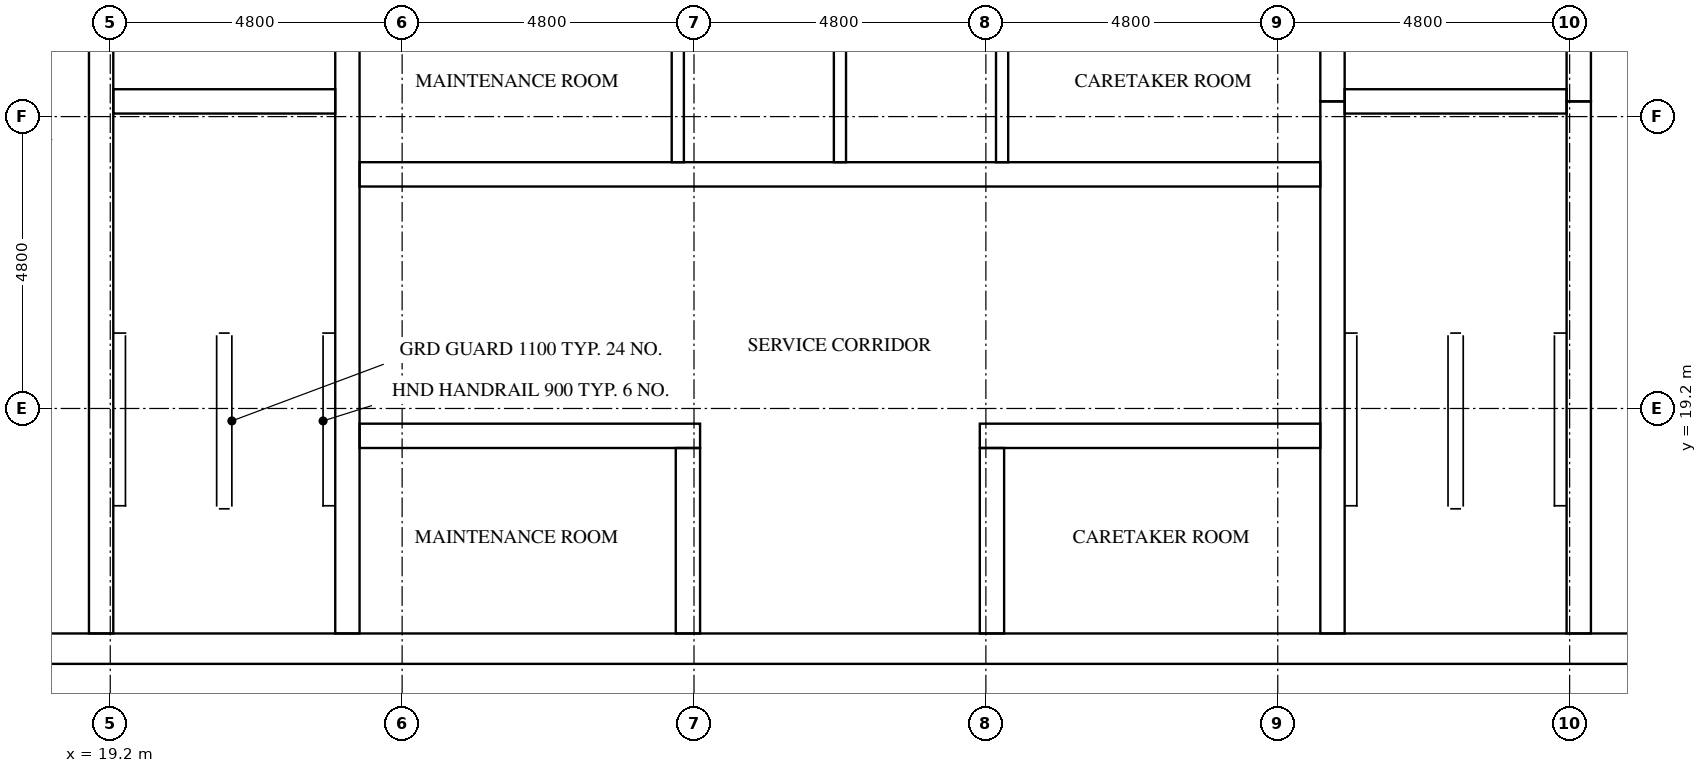
"""IFC4 building model, lengths in metres.
Left out: names, types, materials, properties, quantities, classifications, styles, units other than length and angle.
Written with IfcOpenShell. Run it as: python <this file> out.ifc"""

import sys

from ifc_helpers import new_model, si_unit, direction, frame, frame_2d, origin, place, context, subcontext, project, spatial, rectangle, extrude, element, fill, save


model = new_model("IFC4")
c1 = context("Model", 3, precision=1e-05, world=origin(), true_north=direction((0.0, 1.0)))
c2 = subcontext(c1, "Body", "Model", "MODEL_VIEW")
j1 = project(units=[si_unit("LENGTHUNIT", "METRE"), si_unit("PLANEANGLEUNIT", "RADIAN")], contexts=[c1])
p1 = place(None, origin())
s1 = spatial("IfcSite", under=j1, at=p1, CompositionType="ELEMENT")
p2 = place(p1, origin())
s2 = spatial("IfcBuilding", under=s1, at=p2, CompositionType="ELEMENT")
p3 = place(p2, frame((0.0, 0.0, 275.6)))
s3 = spatial("IfcBuildingStorey", under=s2, at=p3, CompositionType="ELEMENT", Elevation=275.6)
p4 = place(p3, frame((15.0, 15.25, 0.0), z_axis=(0.0, 0.0, 1.0), x_axis=(1.0, 0.0, 0.0)))
e1 = element("IfcWall", 1, at=p4, inside=s3, PredefinedType="SHEAR", context=c2, shape_type="SweptSolid", body=[
    extrude(rectangle(XDim=32.4, YDim=0.5, at=frame_2d((16.2, 0.0))), origin(), (0.0, 0.0, 1.0), 3.2),
])
p5 = place(p4, frame((15.3, 0.0, 0.0)))
e2 = element("IfcOpeningElement", 2, at=p5, cuts=e1, PredefinedType="OPENING", context=c2, shape_type="SweptSolid", body=[
    extrude(rectangle(XDim=1.8, YDim=2.1, at=frame_2d((0.9, 1.05))), frame((0.0, 0.26, 0.0), z_axis=(0.0, -1.0, 0.0), x_axis=(1.0, 0.0, 0.0)), (0.0, 0.0, 1.0), 0.52),
])
p6 = place(p3, frame((19.05, 15.5, 0.0), z_axis=(0.0, 0.0, 1.0), x_axis=(0.0, 1.0, 0.0)))
e3 = element("IfcWall", 3, at=p6, inside=s3, PredefinedType="SHEAR", context=c2, shape_type="SweptSolid", body=[
    extrude(rectangle(XDim=15.55, YDim=0.4, at=frame_2d((7.775, 0.0))), origin(), (0.0, 0.0, 1.0), 3.2),
])
p7 = place(p6, frame((9.95, 0.0, 0.0)))
e4 = element("IfcOpeningElement", 4, at=p7, cuts=e3, PredefinedType="OPENING", context=c2, shape_type="SweptSolid", body=[
    extrude(rectangle(XDim=1.1, YDim=2.1, at=frame_2d((0.55, 1.05))), frame((0.0, 0.21, 0.0), z_axis=(0.0, -1.0, 0.0), x_axis=(1.0, 0.0, 0.0)), (0.0, 0.0, 1.0), 0.42),
])
p8 = place(p6, frame((13.45, 0.0, 0.0)))
e5 = element("IfcOpeningElement", 5, at=p8, cuts=e3, PredefinedType="OPENING", context=c2, shape_type="SweptSolid", body=[
    extrude(rectangle(XDim=1.1, YDim=2.1, at=frame_2d((0.55, 1.05))), frame((0.0, 0.21, 0.0), z_axis=(0.0, -1.0, 0.0), x_axis=(1.0, 0.0, 0.0)), (0.0, 0.0, 1.0), 0.42),
])
p9 = place(p6, frame((0.7, 0.0, 0.0)))
e6 = element("IfcOpeningElement", 6, at=p9, cuts=e3, PredefinedType="OPENING", context=c2, shape_type="SweptSolid", body=[
    extrude(rectangle(XDim=1.2, YDim=2.1, at=frame_2d((0.6, 1.05))), frame((0.0, 0.21, 0.0), z_axis=(0.0, -1.0, 0.0), x_axis=(1.0, 0.0, 0.0)), (0.0, 0.0, 1.0), 0.42),
])
p10 = place(p3, frame((23.1, 15.5, 0.0), z_axis=(0.0, 0.0, 1.0), x_axis=(0.0, 1.0, 0.0)))
e7 = element("IfcWall", 7, at=p10, inside=s3, PredefinedType="SHEAR", context=c2, shape_type="SweptSolid", body=[
    extrude(rectangle(XDim=21.8, YDim=0.4, at=frame_2d((10.9, 0.0))), origin(), (0.0, 0.0, 1.0), 3.2),
])
p11 = place(p3, frame((39.3, 15.5, 0.0), z_axis=(0.0, 0.0, 1.0), x_axis=(0.0, 1.0, 0.0)))
e8 = element("IfcWall", 8, at=p11, inside=s3, PredefinedType="SHEAR", context=c2, shape_type="SweptSolid", body=[
    extrude(rectangle(XDim=8.75, YDim=0.4, at=frame_2d((4.375, 0.0))), origin(), (0.0, 0.0, 1.0), 3.2),
])
p12 = place(p3, frame((39.3, 24.25, 0.0), z_axis=(0.0, 0.0, 1.0), x_axis=(0.0, 1.0, 0.0)))
e9 = element("IfcWall", 9, at=p12, inside=s3, PredefinedType="SHEAR", context=c2, shape_type="SweptSolid", body=[
    extrude(rectangle(XDim=3.5, YDim=0.4, at=frame_2d((1.75, 0.0))), origin(), (0.0, 0.0, 1.0), 3.2),
])
p13 = place(p3, frame((43.35, 15.5, 0.0), z_axis=(0.0, 0.0, 1.0), x_axis=(0.0, 1.0, 0.0)))
e10 = element("IfcWall", 10, at=p13, inside=s3, PredefinedType="SHEAR", context=c2, shape_type="SweptSolid", body=[
    extrude(rectangle(XDim=8.75, YDim=0.4, at=frame_2d((4.375, 0.0))), origin(), (0.0, 0.0, 1.0), 3.2),
])
p14 = place(p13, frame((0.7, 0.0, 0.0)))
e11 = element("IfcOpeningElement", 11, at=p14, cuts=e10, PredefinedType="OPENING", context=c2, shape_type="SweptSolid", body=[
    extrude(rectangle(XDim=1.2, YDim=2.1, at=frame_2d((0.6, 1.05))), frame((0.0, 0.21, 0.0), z_axis=(0.0, -1.0, 0.0), x_axis=(1.0, 0.0, 0.0)), (0.0, 0.0, 1.0), 0.42),
])
p15 = place(p3, frame((43.35, 24.25, 0.0), z_axis=(0.0, 0.0, 1.0), x_axis=(0.0, 1.0, 0.0)))
e12 = element("IfcWall", 12, at=p15, inside=s3, PredefinedType="SHEAR", context=c2, shape_type="SweptSolid", body=[
    extrude(rectangle(XDim=3.5, YDim=0.4, at=frame_2d((1.75, 0.0))), origin(), (0.0, 0.0, 1.0), 3.2),
])
p16 = place(p15, frame((1.2, 0.0, 0.0)))
e13 = element("IfcOpeningElement", 13, at=p16, cuts=e12, PredefinedType="OPENING", context=c2, shape_type="SweptSolid", body=[
    extrude(rectangle(XDim=1.1, YDim=2.1, at=frame_2d((0.55, 1.05))), frame((0.0, 0.21, 0.0), z_axis=(0.0, -1.0, 0.0), x_axis=(1.0, 0.0, 0.0)), (0.0, 0.0, 1.0), 0.42),
])
for number, where, z_axis, x_axis in (
    (14, (19.25, 24.25, 0.0), (0.0, 0.0, 1.0), (1.0, 0.0, 0.0)),
    (15, (39.5, 24.25, 0.0), (0.0, 0.0, 1.0), (1.0, 0.0, 0.0)),
):
    element("IfcWall", number, at=place(p3, frame(where, z_axis=z_axis, x_axis=x_axis)), inside=s3, PredefinedType="SHEAR", context=c2, shape_type="SweptSolid", body=[
        extrude(rectangle(XDim=3.65, YDim=0.4, at=frame_2d((1.825, 0.0))), origin(), (0.0, 0.0, 1.0), 3.2),
    ])
p17 = place(p3, frame((23.3, 18.75, 0.0), z_axis=(0.0, 0.0, 1.0), x_axis=(1.0, 0.0, 0.0)))
e16 = element("IfcWall", 16, at=p17, inside=s3, PredefinedType="SHEAR", context=c2, shape_type="SweptSolid", body=[
    extrude(rectangle(XDim=5.6, YDim=0.4, at=frame_2d((2.8, 0.0))), origin(), (0.0, 0.0, 1.0), 3.2),
])
p18 = place(p17, frame((2.1, 0.0, 0.0)))
e17 = element("IfcOpeningElement", 17, at=p18, cuts=e16, PredefinedType="OPENING", context=c2, shape_type="SweptSolid", body=[
    extrude(rectangle(XDim=1.0, YDim=2.1, at=frame_2d((0.5, 1.05))), frame((0.0, 0.21, 0.0), z_axis=(0.0, -1.0, 0.0), x_axis=(1.0, 0.0, 0.0)), (0.0, 0.0, 1.0), 0.42),
])
p19 = place(p3, frame((33.5, 18.75, 0.0), z_axis=(0.0, 0.0, 1.0), x_axis=(1.0, 0.0, 0.0)))
e18 = element("IfcWall", 18, at=p19, inside=s3, PredefinedType="SHEAR", context=c2, shape_type="SweptSolid", body=[
    extrude(rectangle(XDim=5.6, YDim=0.4, at=frame_2d((2.8, 0.0))), origin(), (0.0, 0.0, 1.0), 3.2),
])
p20 = place(p19, frame((2.5, 0.0, 0.0)))
e19 = element("IfcOpeningElement", 19, at=p20, cuts=e18, PredefinedType="OPENING", context=c2, shape_type="SweptSolid", body=[
    extrude(rectangle(XDim=1.0, YDim=2.1, at=frame_2d((0.5, 1.05))), frame((0.0, 0.21, 0.0), z_axis=(0.0, -1.0, 0.0), x_axis=(1.0, 0.0, 0.0)), (0.0, 0.0, 1.0), 0.42),
])
p21 = place(p3, frame((23.3, 23.05, 0.0), z_axis=(0.0, 0.0, 1.0), x_axis=(1.0, 0.0, 0.0)))
e20 = element("IfcWall", 20, at=p21, inside=s3, PredefinedType="SHEAR", context=c2, shape_type="SweptSolid", body=[
    extrude(rectangle(XDim=15.8, YDim=0.4, at=frame_2d((7.9, 0.0))), origin(), (0.0, 0.0, 1.0), 3.2),
])
p22 = place(p21, frame((2.067, 0.0, 0.0)))
e21 = element("IfcOpeningElement", 21, at=p22, cuts=e20, PredefinedType="OPENING", context=c2, shape_type="SweptSolid", body=[
    extrude(rectangle(XDim=1.0, YDim=2.1, at=frame_2d((0.5, 1.05))), frame((0.0, 0.21, 0.0), z_axis=(0.0, -1.0, 0.0), x_axis=(1.0, 0.0, 0.0)), (0.0, 0.0, 1.0), 0.42),
])
p23 = place(p21, frame((12.733, 0.0, 0.0)))
e22 = element("IfcOpeningElement", 22, at=p23, cuts=e20, PredefinedType="OPENING", context=c2, shape_type="SweptSolid", body=[
    extrude(rectangle(XDim=1.0, YDim=2.1, at=frame_2d((0.5, 1.05))), frame((0.0, 0.21, 0.0), z_axis=(0.0, -1.0, 0.0), x_axis=(1.0, 0.0, 0.0)), (0.0, 0.0, 1.0), 0.42),
])
for number, where, z_axis, x_axis in (
    (23, (28.7, 15.5, 0.0), (0.0, 0.0, 1.0), (0.0, 1.0, 0.0)),
    (24, (33.7, 15.5, 0.0), (0.0, 0.0, 1.0), (0.0, 1.0, 0.0)),
):
    element("IfcWall", number, at=place(p3, frame(where, z_axis=z_axis, x_axis=x_axis)), inside=s3, PredefinedType="SHEAR", context=c2, shape_type="SweptSolid", body=[
        extrude(rectangle(XDim=3.05, YDim=0.4, at=frame_2d((1.525, 0.0))), origin(), (0.0, 0.0, 1.0), 3.2),
    ])
for number, where, z_axis, x_axis in (
    (25, (28.533, 23.25, 0.0), (0.0, 0.0, 1.0), (0.0, 1.0, 0.0)),
    (26, (31.2, 23.25, 0.0), (0.0, 0.0, 1.0), (0.0, 1.0, 0.0)),
    (27, (33.867, 23.25, 0.0), (0.0, 0.0, 1.0), (0.0, 1.0, 0.0)),
):
    element("IfcWall", number, at=place(p3, frame(where, z_axis=z_axis, x_axis=x_axis)), inside=s3, PredefinedType="SOLIDWALL", context=c2, shape_type="SweptSolid", body=[
        extrude(rectangle(XDim=2.7, YDim=0.2, at=frame_2d((1.35, 0.0))), origin(), (0.0, 0.0, 1.0), 3.2),
    ])
p24 = place(p9, frame((1.2, 0.0, 0.0), z_axis=(0.0, 0.0, 1.0), x_axis=(-1.0, 0.0, 0.0)))
e28 = element("IfcDoor", 28, at=p24, inside=s3, OperationType="SINGLE_SWING_RIGHT", PredefinedType="DOOR", context=c2, shape_type="SweptSolid", body=[
    extrude(rectangle(XDim=1.2, YDim=2.1, at=frame_2d((0.6, 1.05))), frame((0.0, 0.025, 0.0), z_axis=(0.0, -1.0, 0.0), x_axis=(1.0, 0.0, 0.0)), (0.0, 0.0, 1.0), 0.05),
])
fill(e6, e28)
p25 = place(p14, origin())
e29 = element("IfcDoor", 29, at=p25, inside=s3, OperationType="SINGLE_SWING_LEFT", PredefinedType="DOOR", context=c2, shape_type="SweptSolid", body=[
    extrude(rectangle(XDim=1.2, YDim=2.1, at=frame_2d((0.6, 1.05))), frame((0.0, 0.025, 0.0), z_axis=(0.0, -1.0, 0.0), x_axis=(1.0, 0.0, 0.0)), (0.0, 0.0, 1.0), 0.05),
])
fill(e11, e29)
p26 = place(p5, frame((1.8, 0.0, 0.0), z_axis=(0.0, 0.0, 1.0), x_axis=(-1.0, 0.0, 0.0)))
e30 = element("IfcDoor", 30, at=p26, inside=s3, OperationType="DOUBLE_DOOR_SINGLE_SWING", PredefinedType="DOOR", context=c2, shape_type="SweptSolid", body=[
    extrude(rectangle(XDim=1.8, YDim=2.1, at=frame_2d((0.9, 1.05))), frame((0.0, 0.025, 0.0), z_axis=(0.0, -1.0, 0.0), x_axis=(1.0, 0.0, 0.0)), (0.0, 0.0, 1.0), 0.05),
])
fill(e2, e30)
p27 = place(p22, frame((1.0, 0.0, 0.0), z_axis=(0.0, 0.0, 1.0), x_axis=(-1.0, 0.0, 0.0)))
e31 = element("IfcDoor", 31, at=p27, inside=s3, OperationType="SINGLE_SWING_LEFT", PredefinedType="DOOR", context=c2, shape_type="SweptSolid", body=[
    extrude(rectangle(XDim=1.0, YDim=2.1, at=frame_2d((0.5, 1.05))), frame((0.0, 0.025, 0.0), z_axis=(0.0, -1.0, 0.0), x_axis=(1.0, 0.0, 0.0)), (0.0, 0.0, 1.0), 0.05),
])
fill(e21, e31)
p28 = place(p23, frame((1.0, 0.0, 0.0), z_axis=(0.0, 0.0, 1.0), x_axis=(-1.0, 0.0, 0.0)))
e32 = element("IfcDoor", 32, at=p28, inside=s3, OperationType="SINGLE_SWING_RIGHT", PredefinedType="DOOR", context=c2, shape_type="SweptSolid", body=[
    extrude(rectangle(XDim=1.0, YDim=2.1, at=frame_2d((0.5, 1.05))), frame((0.0, 0.025, 0.0), z_axis=(0.0, -1.0, 0.0), x_axis=(1.0, 0.0, 0.0)), (0.0, 0.0, 1.0), 0.05),
])
fill(e22, e32)
p29 = place(p18, origin())
e33 = element("IfcDoor", 33, at=p29, inside=s3, OperationType="SINGLE_SWING_LEFT", PredefinedType="DOOR", context=c2, shape_type="SweptSolid", body=[
    extrude(rectangle(XDim=1.0, YDim=2.1, at=frame_2d((0.5, 1.05))), frame((0.0, 0.025, 0.0), z_axis=(0.0, -1.0, 0.0), x_axis=(1.0, 0.0, 0.0)), (0.0, 0.0, 1.0), 0.05),
])
fill(e17, e33)
p30 = place(p20, origin())
e34 = element("IfcDoor", 34, at=p30, inside=s3, OperationType="SINGLE_SWING_RIGHT", PredefinedType="DOOR", context=c2, shape_type="SweptSolid", body=[
    extrude(rectangle(XDim=1.0, YDim=2.1, at=frame_2d((0.5, 1.05))), frame((0.0, 0.025, 0.0), z_axis=(0.0, -1.0, 0.0), x_axis=(1.0, 0.0, 0.0)), (0.0, 0.0, 1.0), 0.05),
])
fill(e19, e34)
save(model, sys.argv[1])
